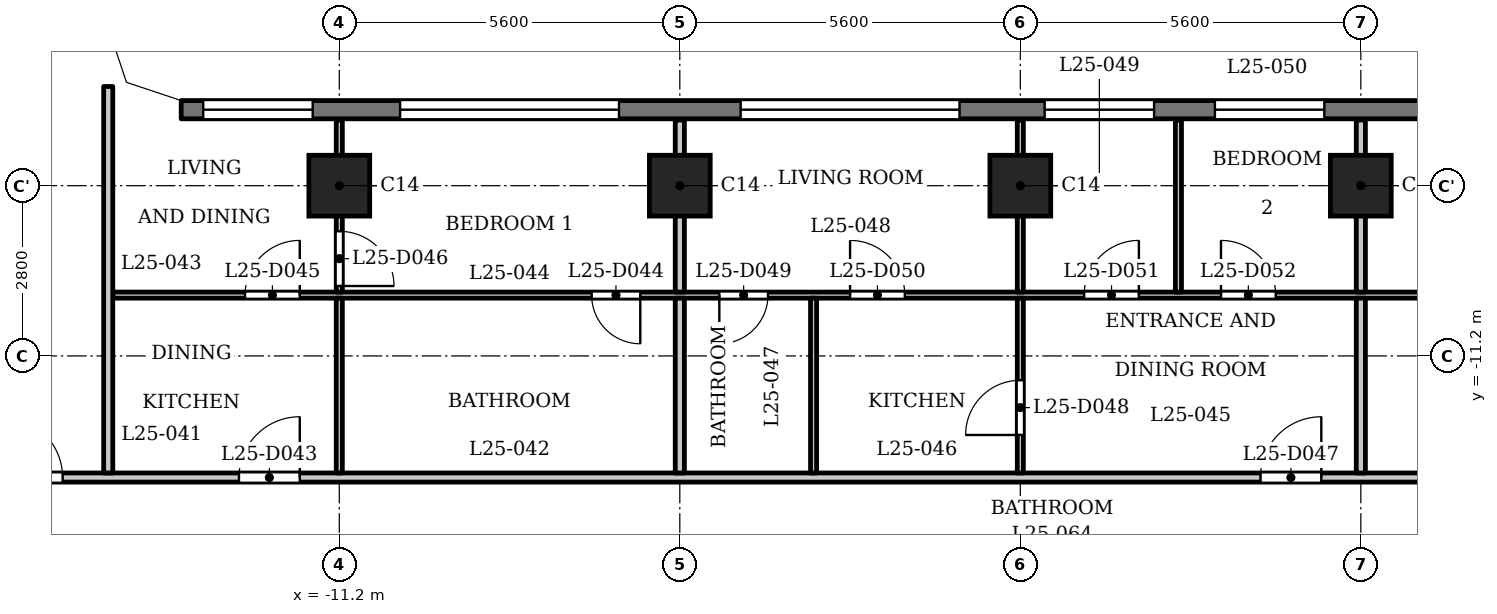
"""IFC4 building model, lengths in metres.
Left out: names, types, materials, properties, quantities, classifications, styles, units other than length and angle.
Written with IfcOpenShell. Run it as: python <this file> out.ifc"""

import sys

from ifc_helpers import new_model, si_unit, direction, frame, frame_2d, origin, origin_2d, place, context, subcontext, project, spatial, polyline, rectangle, outline, extrude, element, fill, save


model = new_model("IFC4")
c1 = context("Model", 3, precision=1e-05, world=origin(), true_north=direction((0.0, 1.0)))
c2 = subcontext(c1, "Body", "Model", "MODEL_VIEW")
j1 = project(units=[si_unit("LENGTHUNIT", "METRE"), si_unit("PLANEANGLEUNIT", "RADIAN")], contexts=[c1])
p1 = place(None, origin())
s1 = spatial("IfcSite", under=j1, at=p1, CompositionType="ELEMENT")
p2 = place(p1, origin())
s2 = spatial("IfcBuilding", under=s1, at=p2, CompositionType="ELEMENT")
p3 = place(p2, frame((0.0, 0.0, 100.8)))
s3 = spatial("IfcBuildingStorey", under=s2, at=p3, CompositionType="ELEMENT", Elevation=100.8)
for number, where, z_axis, x_axis in (
    (1, (-11.2, -8.4, 0.0), (0.0, 0.0, 1.0), (1.0, 0.0, 0.0)),
    (2, (-5.6, -8.4, 0.0), (0.0, 0.0, 1.0), (1.0, 0.0, 0.0)),
    (3, (0.0, -8.4, 0.0), (0.0, 0.0, 1.0), (1.0, 0.0, 0.0)),
    (4, (5.6, -8.4, 0.0), (0.0, 0.0, 1.0), (1.0, 0.0, 0.0)),
):
    element("IfcColumn", number, at=place(p3, frame(where, z_axis=z_axis, x_axis=x_axis)), inside=s3, PredefinedType="COLUMN", context=c2, shape_type="SweptSolid", body=[
        extrude(rectangle(XDim=1.0, YDim=1.0, at=origin_2d()), origin(), (0.0, 0.0, 1.0), 3.5),
    ])
p4 = place(p3, frame((13.8, -7.15, 0.0), z_axis=(0.0, 0.0, 1.0), x_axis=(-1.0, 0.0, 0.0)))
e5 = element("IfcWall", 5, at=p4, inside=s3, PredefinedType="SOLIDWALL", context=c2, shape_type="SweptSolid", body=[
    extrude(rectangle(XDim=27.6, YDim=0.3, at=frame_2d((13.8, 0.0))), origin(), (0.0, 0.0, 1.0), 3.2),
])
p5 = place(p4, frame((0.363, 0.0, 0.9)))
e6 = element("IfcOpeningElement", 6, at=p5, cuts=e5, PredefinedType="OPENING", context=c2, shape_type="SweptSolid", body=[
    extrude(rectangle(XDim=1.8, YDim=1.25, at=frame_2d((0.9, 0.625))), frame((0.0, 0.16, 0.0), z_axis=(0.0, -1.0, 0.0), x_axis=(1.0, 0.0, 0.0)), (0.0, 0.0, 1.0), 0.32),
])
p6 = place(p4, frame((3.6, 0.0, 1.2)))
e7 = element("IfcOpeningElement", 7, at=p6, cuts=e5, PredefinedType="OPENING", context=c2, shape_type="SweptSolid", body=[
    extrude(rectangle(XDim=3.6, YDim=0.95, at=frame_2d((1.8, 0.475))), frame((0.0, 0.16, 0.0), z_axis=(0.0, -1.0, 0.0), x_axis=(1.0, 0.0, 0.0)), (0.0, 0.0, 1.0), 0.32),
])
p7 = place(p4, frame((8.8, 0.0, 0.9)))
e8 = element("IfcOpeningElement", 8, at=p7, cuts=e5, PredefinedType="OPENING", context=c2, shape_type="SweptSolid", body=[
    extrude(rectangle(XDim=1.8, YDim=1.25, at=frame_2d((0.9, 0.625))), frame((0.0, 0.16, 0.0), z_axis=(0.0, -1.0, 0.0), x_axis=(1.0, 0.0, 0.0)), (0.0, 0.0, 1.0), 0.32),
])
p8 = place(p4, frame((11.6, 0.0, 0.9)))
e9 = element("IfcOpeningElement", 9, at=p8, cuts=e5, PredefinedType="OPENING", context=c2, shape_type="SweptSolid", body=[
    extrude(rectangle(XDim=1.8, YDim=1.25, at=frame_2d((0.9, 0.625))), frame((0.0, 0.16, 0.0), z_axis=(0.0, -1.0, 0.0), x_axis=(1.0, 0.0, 0.0)), (0.0, 0.0, 1.0), 0.32),
])
p9 = place(p4, frame((14.8, 0.0, 1.2)))
e10 = element("IfcOpeningElement", 10, at=p9, cuts=e5, PredefinedType="OPENING", context=c2, shape_type="SweptSolid", body=[
    extrude(rectangle(XDim=3.6, YDim=0.95, at=frame_2d((1.8, 0.475))), frame((0.0, 0.16, 0.0), z_axis=(0.0, -1.0, 0.0), x_axis=(1.0, 0.0, 0.0)), (0.0, 0.0, 1.0), 0.32),
])
p10 = place(p4, frame((20.4, 0.0, 1.2)))
e11 = element("IfcOpeningElement", 11, at=p10, cuts=e5, PredefinedType="OPENING", context=c2, shape_type="SweptSolid", body=[
    extrude(rectangle(XDim=3.6, YDim=0.95, at=frame_2d((1.8, 0.475))), frame((0.0, 0.16, 0.0), z_axis=(0.0, -1.0, 0.0), x_axis=(1.0, 0.0, 0.0)), (0.0, 0.0, 1.0), 0.32),
])
p11 = place(p4, frame((25.438, 0.0, 0.9)))
e12 = element("IfcOpeningElement", 12, at=p11, cuts=e5, PredefinedType="OPENING", context=c2, shape_type="SweptSolid", body=[
    extrude(rectangle(XDim=1.8, YDim=1.25, at=frame_2d((0.9, 0.625))), frame((0.0, 0.16, 0.0), z_axis=(0.0, -1.0, 0.0), x_axis=(1.0, 0.0, 0.0)), (0.0, 0.0, 1.0), 0.32),
])
p12 = place(p3, frame((-17.4, -13.2, 0.0), z_axis=(0.0, 0.0, 1.0), x_axis=(1.0, 0.0, 0.0)))
e13 = element("IfcWall", 13, at=p12, inside=s3, PredefinedType="PARTITIONING", context=c2, shape_type="SweptSolid", body=[
    extrude(rectangle(XDim=34.8, YDim=0.15, at=frame_2d((17.4, 0.0))), origin(), (0.0, 0.0, 1.0), 3.2),
])
p13 = place(p12, frame((0.65, 0.0, 0.0)))
e14 = element("IfcOpeningElement", 14, at=p13, cuts=e13, PredefinedType="OPENING", context=c2, shape_type="SweptSolid", body=[
    extrude(rectangle(XDim=1.0, YDim=2.1, at=frame_2d((0.5, 1.05))), frame((0.0, 0.085, 0.0), z_axis=(0.0, -1.0, 0.0), x_axis=(1.0, 0.0, 0.0)), (0.0, 0.0, 1.0), 0.17),
])
p14 = place(p12, frame((33.05, 0.0, 0.0)))
e15 = element("IfcOpeningElement", 15, at=p14, cuts=e13, PredefinedType="OPENING", context=c2, shape_type="SweptSolid", body=[
    extrude(rectangle(XDim=1.0, YDim=2.1, at=frame_2d((0.5, 1.05))), frame((0.0, 0.085, 0.0), z_axis=(0.0, -1.0, 0.0), x_axis=(1.0, 0.0, 0.0)), (0.0, 0.0, 1.0), 0.17),
])
p15 = place(p12, frame((4.55, 0.0, 0.0)))
e16 = element("IfcOpeningElement", 16, at=p15, cuts=e13, PredefinedType="OPENING", context=c2, shape_type="SweptSolid", body=[
    extrude(rectangle(XDim=1.0, YDim=2.1, at=frame_2d((0.5, 1.05))), frame((0.0, 0.085, 0.0), z_axis=(0.0, -1.0, 0.0), x_axis=(1.0, 0.0, 0.0)), (0.0, 0.0, 1.0), 0.17),
])
p16 = place(p12, frame((21.35, 0.0, 0.0)))
e17 = element("IfcOpeningElement", 17, at=p16, cuts=e13, PredefinedType="OPENING", context=c2, shape_type="SweptSolid", body=[
    extrude(rectangle(XDim=1.0, YDim=2.1, at=frame_2d((0.5, 1.05))), frame((0.0, 0.085, 0.0), z_axis=(0.0, -1.0, 0.0), x_axis=(1.0, 0.0, 0.0)), (0.0, 0.0, 1.0), 0.17),
])
p17 = place(p12, frame((30.75, 0.0, 0.0)))
e18 = element("IfcOpeningElement", 18, at=p17, cuts=e13, PredefinedType="OPENING", context=c2, shape_type="SweptSolid", body=[
    extrude(rectangle(XDim=1.0, YDim=2.1, at=frame_2d((0.5, 1.05))), frame((0.0, 0.085, 0.0), z_axis=(0.0, -1.0, 0.0), x_axis=(1.0, 0.0, 0.0)), (0.0, 0.0, 1.0), 0.17),
])
p18 = place(p3, frame((-14.925, -10.2, 0.0), z_axis=(0.0, 0.0, 1.0), x_axis=(1.0, 0.0, 0.0)))
e19 = element("IfcWall", 19, at=p18, inside=s3, PredefinedType="PARTITIONING", context=c2, shape_type="SweptSolid", body=[
    extrude(rectangle(XDim=29.85, YDim=0.1, at=frame_2d((14.925, 0.0))), origin(), (0.0, 0.0, 1.0), 3.2),
])
p19 = place(p18, frame((7.875, 0.0, 0.0)))
e20 = element("IfcOpeningElement", 20, at=p19, cuts=e19, PredefinedType="OPENING", context=c2, shape_type="SweptSolid", body=[
    extrude(rectangle(XDim=0.8, YDim=2.1, at=frame_2d((0.4, 1.05))), frame((0.0, 0.06, 0.0), z_axis=(0.0, -1.0, 0.0), x_axis=(1.0, 0.0, 0.0)), (0.0, 0.0, 1.0), 0.12),
])
p20 = place(p18, frame((2.175, 0.0, 0.0)))
e21 = element("IfcOpeningElement", 21, at=p20, cuts=e19, PredefinedType="OPENING", context=c2, shape_type="SweptSolid", body=[
    extrude(rectangle(XDim=0.9, YDim=2.1, at=frame_2d((0.45, 1.05))), frame((0.0, 0.06, 0.0), z_axis=(0.0, -1.0, 0.0), x_axis=(1.0, 0.0, 0.0)), (0.0, 0.0, 1.0), 0.12),
])
p21 = place(p18, frame((9.975, 0.0, 0.0)))
e22 = element("IfcOpeningElement", 22, at=p21, cuts=e19, PredefinedType="OPENING", context=c2, shape_type="SweptSolid", body=[
    extrude(rectangle(XDim=0.8, YDim=2.1, at=frame_2d((0.4, 1.05))), frame((0.0, 0.06, 0.0), z_axis=(0.0, -1.0, 0.0), x_axis=(1.0, 0.0, 0.0)), (0.0, 0.0, 1.0), 0.12),
])
p22 = place(p18, frame((12.125, 0.0, 0.0)))
e23 = element("IfcOpeningElement", 23, at=p22, cuts=e19, PredefinedType="OPENING", context=c2, shape_type="SweptSolid", body=[
    extrude(rectangle(XDim=0.9, YDim=2.1, at=frame_2d((0.45, 1.05))), frame((0.0, 0.06, 0.0), z_axis=(0.0, -1.0, 0.0), x_axis=(1.0, 0.0, 0.0)), (0.0, 0.0, 1.0), 0.12),
])
p23 = place(p18, frame((15.975, 0.0, 0.0)))
e24 = element("IfcOpeningElement", 24, at=p23, cuts=e19, PredefinedType="OPENING", context=c2, shape_type="SweptSolid", body=[
    extrude(rectangle(XDim=0.9, YDim=2.1, at=frame_2d((0.45, 1.05))), frame((0.0, 0.06, 0.0), z_axis=(0.0, -1.0, 0.0), x_axis=(1.0, 0.0, 0.0)), (0.0, 0.0, 1.0), 0.12),
])
p24 = place(p18, frame((18.225, 0.0, 0.0)))
e25 = element("IfcOpeningElement", 25, at=p24, cuts=e19, PredefinedType="OPENING", context=c2, shape_type="SweptSolid", body=[
    extrude(rectangle(XDim=0.9, YDim=2.1, at=frame_2d((0.45, 1.05))), frame((0.0, 0.06, 0.0), z_axis=(0.0, -1.0, 0.0), x_axis=(1.0, 0.0, 0.0)), (0.0, 0.0, 1.0), 0.12),
])
p25 = place(p18, frame((24.675, 0.0, 0.0)))
e26 = element("IfcOpeningElement", 26, at=p25, cuts=e19, PredefinedType="OPENING", context=c2, shape_type="SweptSolid", body=[
    extrude(rectangle(XDim=0.8, YDim=2.1, at=frame_2d((0.4, 1.05))), frame((0.0, 0.06, 0.0), z_axis=(0.0, -1.0, 0.0), x_axis=(1.0, 0.0, 0.0)), (0.0, 0.0, 1.0), 0.12),
])
p26 = place(p18, frame((28.375, 0.0, 0.0)))
e27 = element("IfcOpeningElement", 27, at=p26, cuts=e19, PredefinedType="OPENING", context=c2, shape_type="SweptSolid", body=[
    extrude(rectangle(XDim=0.9, YDim=2.1, at=frame_2d((0.45, 1.05))), frame((0.0, 0.06, 0.0), z_axis=(0.0, -1.0, 0.0), x_axis=(1.0, 0.0, 0.0)), (0.0, 0.0, 1.0), 0.12),
])
p27 = place(p3, frame((-15.0, -13.125, 0.0), z_axis=(0.0, 0.0, 1.0), x_axis=(0.0, 1.0, 0.0)))
e28 = element("IfcWall", 28, at=p27, inside=s3, PredefinedType="PARTITIONING", context=c2, shape_type="SweptSolid", body=[
    extrude(rectangle(XDim=6.356, YDim=0.15, at=frame_2d((3.178, 0.0))), origin(), (0.0, 0.0, 1.0), 3.2),
])
p28 = place(p3, frame((-11.2, -13.125, 0.0), z_axis=(0.0, 0.0, 1.0), x_axis=(0.0, 1.0, 0.0)))
e29 = element("IfcWall", 29, at=p28, inside=s3, PredefinedType="PARTITIONING", context=c2, shape_type="SweptSolid", body=[
    extrude(rectangle(XDim=2.875, YDim=0.1, at=frame_2d((1.438, 0.0))), origin(), (0.0, 0.0, 1.0), 3.2),
])
p29 = place(p3, frame((-11.2, -10.15, 0.0), z_axis=(0.0, 0.0, 1.0), x_axis=(0.0, 1.0, 0.0)))
e30 = element("IfcWall", 30, at=p29, inside=s3, PredefinedType="PARTITIONING", context=c2, shape_type="SweptSolid", body=[
    extrude(rectangle(XDim=2.83, YDim=0.1, at=frame_2d((1.415, 0.0))), origin(), (0.0, 0.0, 1.0), 3.2),
])
p30 = place(p29, frame((0.1, 0.0, 0.0)))
e31 = element("IfcOpeningElement", 31, at=p30, cuts=e30, PredefinedType="OPENING", context=c2, shape_type="SweptSolid", body=[
    extrude(rectangle(XDim=0.9, YDim=2.1, at=frame_2d((0.45, 1.05))), frame((0.0, 0.06, 0.0), z_axis=(0.0, -1.0, 0.0), x_axis=(1.0, 0.0, 0.0)), (0.0, 0.0, 1.0), 0.12),
])
p31 = place(p3, frame((-5.6, -13.125, 0.0), z_axis=(0.0, 0.0, 1.0), x_axis=(0.0, 1.0, 0.0)))
e32 = element("IfcWall", 32, at=p31, inside=s3, PredefinedType="PARTITIONING", context=c2, shape_type="SweptSolid", body=[
    extrude(rectangle(XDim=2.875, YDim=0.15, at=frame_2d((1.438, 0.0))), origin(), (0.0, 0.0, 1.0), 3.2),
])
p32 = place(p3, frame((-5.6, -10.15, 0.0), z_axis=(0.0, 0.0, 1.0), x_axis=(0.0, 1.0, 0.0)))
e33 = element("IfcWall", 33, at=p32, inside=s3, PredefinedType="PARTITIONING", context=c2, shape_type="SweptSolid", body=[
    extrude(rectangle(XDim=2.83, YDim=0.15, at=frame_2d((1.415, 0.0))), origin(), (0.0, 0.0, 1.0), 3.2),
])
p33 = place(p3, frame((-3.4, -13.125, 0.0), z_axis=(0.0, 0.0, 1.0), x_axis=(0.0, 1.0, 0.0)))
e34 = element("IfcWall", 34, at=p33, inside=s3, PredefinedType="PARTITIONING", context=c2, shape_type="SweptSolid", body=[
    extrude(rectangle(XDim=2.875, YDim=0.1, at=frame_2d((1.438, 0.0))), origin(), (0.0, 0.0, 1.0), 3.2),
])
p34 = place(p3, frame((0.0, -13.125, 0.0), z_axis=(0.0, 0.0, 1.0), x_axis=(0.0, 1.0, 0.0)))
e35 = element("IfcWall", 35, at=p34, inside=s3, PredefinedType="PARTITIONING", context=c2, shape_type="SweptSolid", body=[
    extrude(rectangle(XDim=2.875, YDim=0.1, at=frame_2d((1.438, 0.0))), origin(), (0.0, 0.0, 1.0), 3.2),
])
p35 = place(p34, frame((0.625, 0.0, 0.0)))
e36 = element("IfcOpeningElement", 36, at=p35, cuts=e35, PredefinedType="OPENING", context=c2, shape_type="SweptSolid", body=[
    extrude(rectangle(XDim=0.9, YDim=2.1, at=frame_2d((0.45, 1.05))), frame((0.0, 0.06, 0.0), z_axis=(0.0, -1.0, 0.0), x_axis=(1.0, 0.0, 0.0)), (0.0, 0.0, 1.0), 0.12),
])
for number, where, z_axis, x_axis in (
    (37, (0.0, -10.15, 0.0), (0.0, 0.0, 1.0), (0.0, 1.0, 0.0)),
    (38, (2.6, -10.15, 0.0), (0.0, 0.0, 1.0), (0.0, 1.0, 0.0)),
):
    element("IfcWall", number, at=place(p3, frame(where, z_axis=z_axis, x_axis=x_axis)), inside=s3, PredefinedType="PARTITIONING", context=c2, shape_type="SweptSolid", body=[
        extrude(rectangle(XDim=2.83, YDim=0.1, at=frame_2d((1.415, 0.0))), origin(), (0.0, 0.0, 1.0), 3.2),
    ])
p36 = place(p3, frame((5.6, -13.125, 0.0), z_axis=(0.0, 0.0, 1.0), x_axis=(0.0, 1.0, 0.0)))
e39 = element("IfcWall", 39, at=p36, inside=s3, PredefinedType="PARTITIONING", context=c2, shape_type="SweptSolid", body=[
    extrude(rectangle(XDim=2.875, YDim=0.15, at=frame_2d((1.438, 0.0))), origin(), (0.0, 0.0, 1.0), 3.2),
])
p37 = place(p3, frame((5.6, -10.15, 0.0), z_axis=(0.0, 0.0, 1.0), x_axis=(0.0, 1.0, 0.0)))
e40 = element("IfcWall", 40, at=p37, inside=s3, PredefinedType="PARTITIONING", context=c2, shape_type="SweptSolid", body=[
    extrude(rectangle(XDim=2.83, YDim=0.15, at=frame_2d((1.415, 0.0))), origin(), (0.0, 0.0, 1.0), 3.2),
])
p38 = place(p3, origin())
e41 = element("IfcWall", 41, at=p38, inside=s3, PredefinedType="SOLIDWALL", context=c2, shape_type="SweptSolid", body=[
    extrude(outline(polyline([(-14.937, -6.937), (-13.849, -7.3), (-13.8, -7.3), (-13.8, -7.0), (-14.7, -6.7), (-15.0, -5.8), (-15.3, -5.8), (-15.3, -5.849), (-14.937, -6.937)])), origin(), (0.0, 0.0, 1.0), 3.2),
])
p39 = place(p13, origin())
e42 = element("IfcDoor", 42, at=p39, inside=s3, OperationType="SINGLE_SWING_RIGHT", PredefinedType="DOOR", context=c2, shape_type="SweptSolid", body=[
    extrude(rectangle(XDim=1.0, YDim=2.1, at=frame_2d((0.5, 1.05))), frame((0.0, 0.025, 0.0), z_axis=(0.0, -1.0, 0.0), x_axis=(1.0, 0.0, 0.0)), (0.0, 0.0, 1.0), 0.05),
])
fill(e14, e42)
p40 = place(p15, origin())
e43 = element("IfcDoor", 43, at=p40, inside=s3, OperationType="SINGLE_SWING_LEFT", PredefinedType="DOOR", context=c2, shape_type="SweptSolid", body=[
    extrude(rectangle(XDim=1.0, YDim=2.1, at=frame_2d((0.5, 1.05))), frame((0.0, 0.025, 0.0), z_axis=(0.0, -1.0, 0.0), x_axis=(1.0, 0.0, 0.0)), (0.0, 0.0, 1.0), 0.05),
])
fill(e16, e43)
p41 = place(p19, origin())
e44 = element("IfcDoor", 44, at=p41, inside=s3, OperationType="SINGLE_SWING_RIGHT", PredefinedType="DOOR", context=c2, shape_type="SweptSolid", body=[
    extrude(rectangle(XDim=0.8, YDim=2.1, at=frame_2d((0.4, 1.05))), frame((0.0, 0.025, 0.0), z_axis=(0.0, -1.0, 0.0), x_axis=(1.0, 0.0, 0.0)), (0.0, 0.0, 1.0), 0.05),
])
fill(e20, e44)
p42 = place(p20, origin())
e45 = element("IfcDoor", 45, at=p42, inside=s3, OperationType="SINGLE_SWING_LEFT", PredefinedType="DOOR", context=c2, shape_type="SweptSolid", body=[
    extrude(rectangle(XDim=0.9, YDim=2.1, at=frame_2d((0.45, 1.05))), frame((0.0, 0.025, 0.0), z_axis=(0.0, -1.0, 0.0), x_axis=(1.0, 0.0, 0.0)), (0.0, 0.0, 1.0), 0.05),
])
fill(e21, e45)
p43 = place(p30, origin())
e46 = element("IfcDoor", 46, at=p43, inside=s3, OperationType="SINGLE_SWING_LEFT", PredefinedType="DOOR", context=c2, shape_type="SweptSolid", body=[
    extrude(rectangle(XDim=0.9, YDim=2.1, at=frame_2d((0.45, 1.05))), frame((0.0, 0.025, 0.0), z_axis=(0.0, -1.0, 0.0), x_axis=(1.0, 0.0, 0.0)), (0.0, 0.0, 1.0), 0.05),
])
fill(e31, e46)
p44 = place(p16, origin())
e47 = element("IfcDoor", 47, at=p44, inside=s3, OperationType="SINGLE_SWING_LEFT", PredefinedType="DOOR", context=c2, shape_type="SweptSolid", body=[
    extrude(rectangle(XDim=1.0, YDim=2.1, at=frame_2d((0.5, 1.05))), frame((0.0, 0.025, 0.0), z_axis=(0.0, -1.0, 0.0), x_axis=(1.0, 0.0, 0.0)), (0.0, 0.0, 1.0), 0.05),
])
fill(e17, e47)
p45 = place(p35, origin())
e48 = element("IfcDoor", 48, at=p45, inside=s3, OperationType="SINGLE_SWING_RIGHT", PredefinedType="DOOR", context=c2, shape_type="SweptSolid", body=[
    extrude(rectangle(XDim=0.9, YDim=2.1, at=frame_2d((0.45, 1.05))), frame((0.0, 0.025, 0.0), z_axis=(0.0, -1.0, 0.0), x_axis=(1.0, 0.0, 0.0)), (0.0, 0.0, 1.0), 0.05),
])
fill(e36, e48)
p46 = place(p21, origin())
e49 = element("IfcDoor", 49, at=p46, inside=s3, OperationType="SINGLE_SWING_LEFT", PredefinedType="DOOR", context=c2, shape_type="SweptSolid", body=[
    extrude(rectangle(XDim=0.8, YDim=2.1, at=frame_2d((0.4, 1.05))), frame((0.0, 0.025, 0.0), z_axis=(0.0, -1.0, 0.0), x_axis=(1.0, 0.0, 0.0)), (0.0, 0.0, 1.0), 0.05),
])
fill(e22, e49)
p47 = place(p22, origin())
e50 = element("IfcDoor", 50, at=p47, inside=s3, OperationType="SINGLE_SWING_RIGHT", PredefinedType="DOOR", context=c2, shape_type="SweptSolid", body=[
    extrude(rectangle(XDim=0.9, YDim=2.1, at=frame_2d((0.45, 1.05))), frame((0.0, 0.025, 0.0), z_axis=(0.0, -1.0, 0.0), x_axis=(1.0, 0.0, 0.0)), (0.0, 0.0, 1.0), 0.05),
])
fill(e23, e50)
p48 = place(p23, origin())
e51 = element("IfcDoor", 51, at=p48, inside=s3, OperationType="SINGLE_SWING_LEFT", PredefinedType="DOOR", context=c2, shape_type="SweptSolid", body=[
    extrude(rectangle(XDim=0.9, YDim=2.1, at=frame_2d((0.45, 1.05))), frame((0.0, 0.025, 0.0), z_axis=(0.0, -1.0, 0.0), x_axis=(1.0, 0.0, 0.0)), (0.0, 0.0, 1.0), 0.05),
])
fill(e24, e51)
p49 = place(p24, origin())
e52 = element("IfcDoor", 52, at=p49, inside=s3, OperationType="SINGLE_SWING_RIGHT", PredefinedType="DOOR", context=c2, shape_type="SweptSolid", body=[
    extrude(rectangle(XDim=0.9, YDim=2.1, at=frame_2d((0.45, 1.05))), frame((0.0, 0.025, 0.0), z_axis=(0.0, -1.0, 0.0), x_axis=(1.0, 0.0, 0.0)), (0.0, 0.0, 1.0), 0.05),
])
fill(e25, e52)
p50 = place(p7, origin())
e53 = element("IfcWindow", 53, at=p50, inside=s3, PartitioningType="SINGLE_PANEL", PredefinedType="WINDOW", context=c2, shape_type="SweptSolid", body=[
    extrude(rectangle(XDim=1.8, YDim=1.25, at=frame_2d((0.9, 0.625))), frame((0.0, 0.03, 0.0), z_axis=(0.0, -1.0, 0.0), x_axis=(1.0, 0.0, 0.0)), (0.0, 0.0, 1.0), 0.06),
])
fill(e8, e53)
p51 = place(p8, origin())
e54 = element("IfcWindow", 54, at=p51, inside=s3, PartitioningType="SINGLE_PANEL", PredefinedType="WINDOW", context=c2, shape_type="SweptSolid", body=[
    extrude(rectangle(XDim=1.8, YDim=1.25, at=frame_2d((0.9, 0.625))), frame((0.0, 0.03, 0.0), z_axis=(0.0, -1.0, 0.0), x_axis=(1.0, 0.0, 0.0)), (0.0, 0.0, 1.0), 0.06),
])
fill(e9, e54)
p52 = place(p9, origin())
e55 = element("IfcWindow", 55, at=p52, inside=s3, PartitioningType="SINGLE_PANEL", PredefinedType="WINDOW", context=c2, shape_type="SweptSolid", body=[
    extrude(rectangle(XDim=3.6, YDim=0.95, at=frame_2d((1.8, 0.475))), frame((0.0, 0.03, 0.0), z_axis=(0.0, -1.0, 0.0), x_axis=(1.0, 0.0, 0.0)), (0.0, 0.0, 1.0), 0.06),
])
fill(e10, e55)
p53 = place(p10, origin())
e56 = element("IfcWindow", 56, at=p53, inside=s3, PartitioningType="SINGLE_PANEL", PredefinedType="WINDOW", context=c2, shape_type="SweptSolid", body=[
    extrude(rectangle(XDim=3.6, YDim=0.95, at=frame_2d((1.8, 0.475))), frame((0.0, 0.03, 0.0), z_axis=(0.0, -1.0, 0.0), x_axis=(1.0, 0.0, 0.0)), (0.0, 0.0, 1.0), 0.06),
])
fill(e11, e56)
p54 = place(p11, origin())
e57 = element("IfcWindow", 57, at=p54, inside=s3, PartitioningType="SINGLE_PANEL", PredefinedType="WINDOW", context=c2, shape_type="SweptSolid", body=[
    extrude(rectangle(XDim=1.8, YDim=1.25, at=frame_2d((0.9, 0.625))), frame((0.0, 0.03, 0.0), z_axis=(0.0, -1.0, 0.0), x_axis=(1.0, 0.0, 0.0)), (0.0, 0.0, 1.0), 0.06),
])
fill(e12, e57)
save(model, sys.argv[1])
